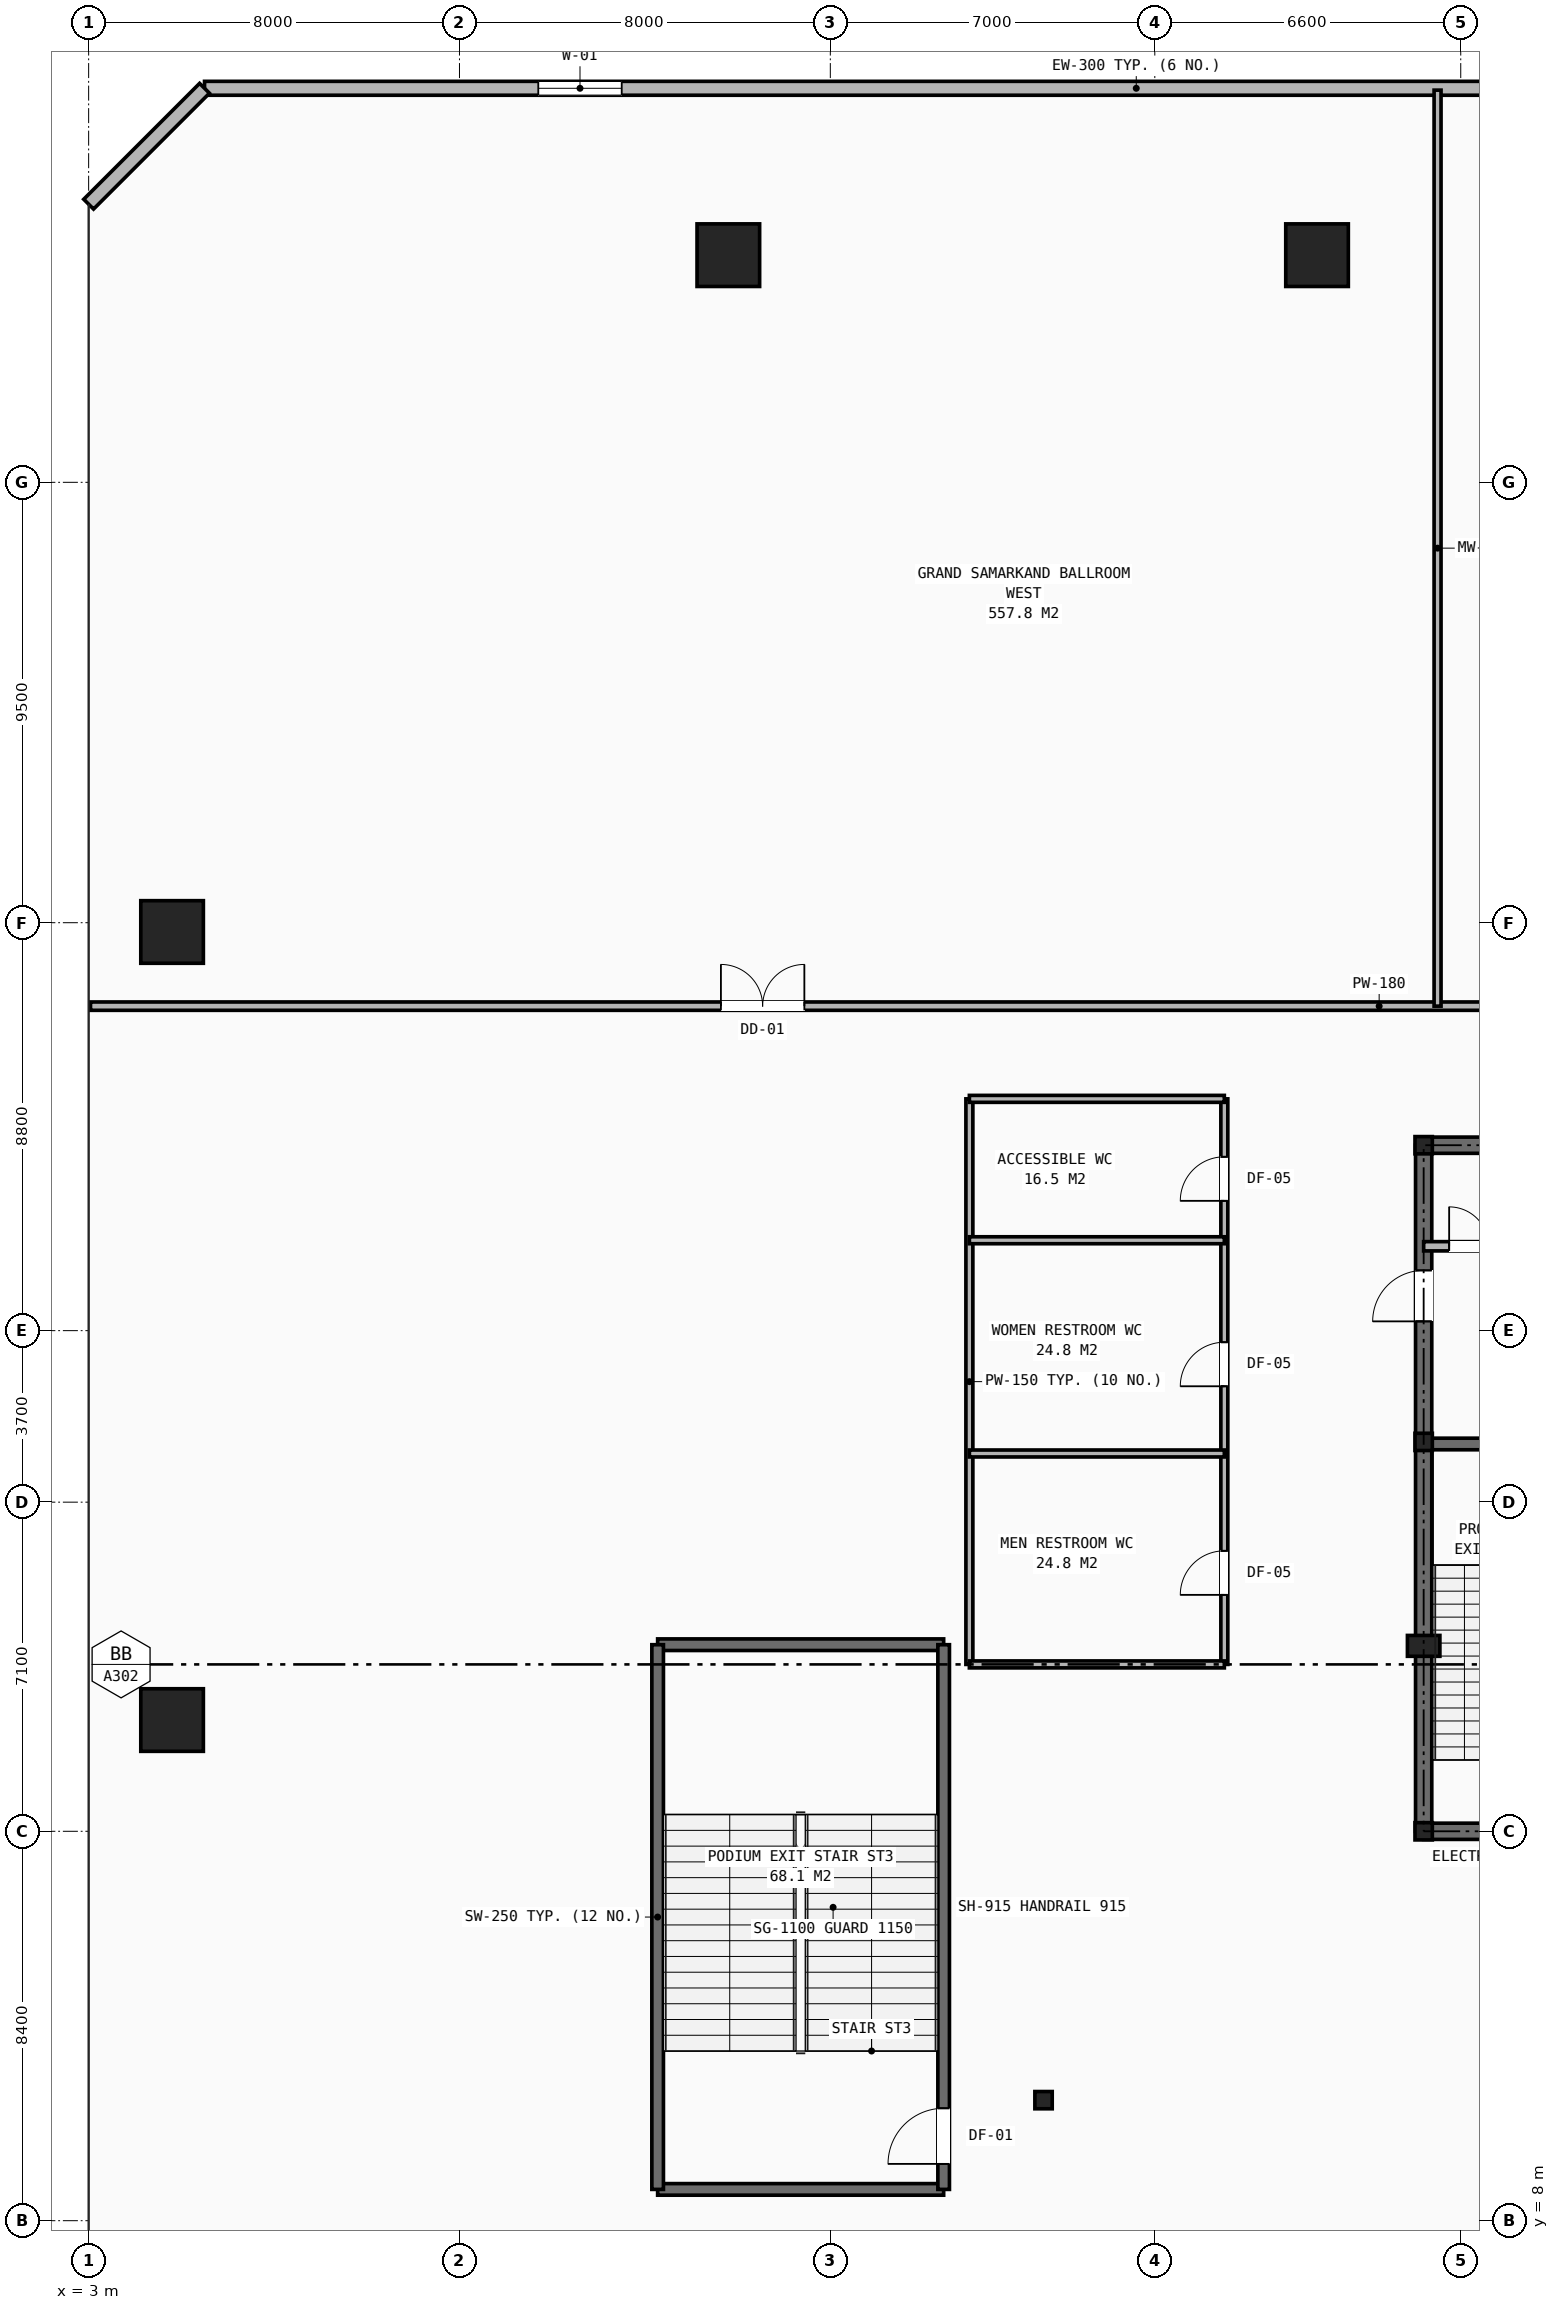
"""IFC4 building model, lengths in metres.
Left out: names, types, materials, properties, quantities, classifications, styles, units other than length and angle.
Written with IfcOpenShell. Run it as: python <this file> out.ifc"""

import sys

from ifc_helpers import new_model, si_unit, direction, frame, frame_2d, origin, origin_2d, place, context, subcontext, project, spatial, rectangle, hollow_rectangle, i_section, extrude, element, fill, save


model = new_model("IFC4")
c1 = context("Model", 3, precision=1e-05, world=origin(), true_north=direction((0.0, 1.0)))
c2 = subcontext(c1, "Body", "Model", "MODEL_VIEW")
j1 = project(units=[si_unit("LENGTHUNIT", "METRE"), si_unit("PLANEANGLEUNIT", "RADIAN")], contexts=[c1])
p1 = place(None, origin())
s1 = spatial("IfcSite", under=j1, at=p1, CompositionType="ELEMENT")
p2 = place(p1, origin())
s2 = spatial("IfcBuilding", under=s1, at=p2, CompositionType="ELEMENT")
p3 = place(p2, frame((0.0, 0.0, 16.5)))
s3 = spatial("IfcBuildingStorey", under=s2, at=p3, CompositionType="ELEMENT", Elevation=16.5)
for number, where, z_axis, x_axis in (
    (1, (31.8, 16.4, 0.0), (0.0, 0.0, 1.0), (1.0, 0.0, 0.0)),
    (2, (31.8, 24.8, 0.0), (0.0, 0.0, 1.0), (1.0, 0.0, 0.0)),
    (3, (31.8, 31.2, 0.0), (0.0, 0.0, 1.0), (1.0, 0.0, 0.0)),
    (4, (23.6, 10.6, 0.0), (0.0, 0.0, 1.0), (1.0, 0.0, 0.0)),
):
    element("IfcColumn", number, at=place(p3, frame(where, z_axis=z_axis, x_axis=x_axis)), inside=s3, PredefinedType="COLUMN", context=c2, shape_type="SweptSolid", body=[
        extrude(i_section(OverallWidth=0.374, OverallDepth=0.372, WebThickness=0.016, FlangeThickness=0.026, at=origin_2d()), origin(), (0.0, 0.0, 1.0), 5.5),
    ])
p4 = place(p3, frame((31.8, 20.4, 0.0), z_axis=(0.0, 0.0, 1.0), x_axis=(1.0, 0.0, 0.0)))
e5 = element("IfcColumn", 5, at=p4, inside=s3, PredefinedType="PILASTER", context=c2, shape_type="SweptSolid", body=[
    extrude(rectangle(XDim=0.7, YDim=0.45, at=origin_2d()), origin(), (0.0, 0.0, 1.0), 5.5),
])
for number, where, z_axis, x_axis in (
    (6, (4.8, 18.8, 0.0), (0.0, 0.0, 1.0), (1.0, 0.0, 0.0)),
    (7, (4.8, 35.8, 0.0), (0.0, 0.0, 1.0), (1.0, 0.0, 0.0)),
    (8, (16.8, 50.4, 0.0), (0.0, 0.0, 1.0), (1.0, 0.0, 0.0)),
    (9, (29.5, 50.4, 0.0), (0.0, 0.0, 1.0), (1.0, 0.0, 0.0)),
):
    element("IfcColumn", number, at=place(p3, frame(where, z_axis=z_axis, x_axis=x_axis)), inside=s3, PredefinedType="COLUMN", context=c2, shape_type="SweptSolid", body=[
        extrude(hollow_rectangle(XDim=1.35, YDim=1.35, WallThickness=0.085, at=origin_2d()), origin(), (0.0, 0.0, 1.0), 5.5),
    ])
p5 = place(p3, frame((74.5, 54.0, 0.0), z_axis=(0.0, 0.0, 1.0), x_axis=(-1.0, 0.0, 0.0)))
e10 = element("IfcWall", 10, at=p5, inside=s3, PredefinedType="STANDARD", context=c2, shape_type="SweptSolid", body=[
    extrude(rectangle(XDim=69.0, YDim=0.3, at=frame_2d((34.5, 0.0))), origin(), (0.0, 0.0, 1.0), 5.18),
])
p6 = place(p5, frame((8.0, 0.0, 1.1)))
e11 = element("IfcOpeningElement", 11, at=p6, cuts=e10, PredefinedType="OPENING", context=c2, shape_type="SweptSolid", body=[
    extrude(rectangle(XDim=1.8, YDim=2.1, at=frame_2d((0.9, 1.05))), frame((0.0, 0.16, 0.0), z_axis=(0.0, -1.0, 0.0), x_axis=(1.0, 0.0, 0.0)), (0.0, 0.0, 1.0), 0.32),
])
p7 = place(p5, frame((16.0, 0.0, 1.1)))
e12 = element("IfcOpeningElement", 12, at=p7, cuts=e10, PredefinedType="OPENING", context=c2, shape_type="SweptSolid", body=[
    extrude(rectangle(XDim=1.8, YDim=2.1, at=frame_2d((0.9, 1.05))), frame((0.0, 0.16, 0.0), z_axis=(0.0, -1.0, 0.0), x_axis=(1.0, 0.0, 0.0)), (0.0, 0.0, 1.0), 0.32),
])
p8 = place(p5, frame((36.0, 0.0, 1.1)))
e13 = element("IfcOpeningElement", 13, at=p8, cuts=e10, PredefinedType="OPENING", context=c2, shape_type="SweptSolid", body=[
    extrude(rectangle(XDim=1.8, YDim=2.1, at=frame_2d((0.9, 1.05))), frame((0.0, 0.16, 0.0), z_axis=(0.0, -1.0, 0.0), x_axis=(1.0, 0.0, 0.0)), (0.0, 0.0, 1.0), 0.32),
])
p9 = place(p5, frame((60.0, 0.0, 1.1)))
e14 = element("IfcOpeningElement", 14, at=p9, cuts=e10, PredefinedType="OPENING", context=c2, shape_type="SweptSolid", body=[
    extrude(rectangle(XDim=1.8, YDim=2.1, at=frame_2d((0.9, 1.05))), frame((0.0, 0.16, 0.0), z_axis=(0.0, -1.0, 0.0), x_axis=(1.0, 0.0, 0.0)), (0.0, 0.0, 1.0), 0.32),
])
p10 = place(p3, frame((5.5, 54.0, 0.0), z_axis=(0.0, 0.0, 1.0), x_axis=(-0.707106781187, -0.707106781187, 0.0)))
e15 = element("IfcWall", 15, at=p10, inside=s3, PredefinedType="STANDARD", context=c2, shape_type="SweptSolid", body=[
    extrude(rectangle(XDim=3.536, YDim=0.3, at=frame_2d((1.768, 0.0))), origin(), (0.0, 0.0, 1.0), 5.18),
])
p11 = place(p3, frame((31.8, 16.4, 0.0), z_axis=(0.0, 0.0, 1.0), x_axis=(1.0, 0.0, 0.0)))
e16 = element("IfcWall", 16, at=p11, inside=s3, PredefinedType="SHEAR", context=c2, shape_type="SweptSolid", body=[
    extrude(rectangle(XDim=16.4, YDim=0.35, at=frame_2d((8.2, 0.0))), origin(), (0.0, 0.0, 1.0), 5.18),
])
p12 = place(p11, frame((7.75, 0.0, 0.0)))
e17 = element("IfcOpeningElement", 17, at=p12, cuts=e16, PredefinedType="OPENING", context=c2, shape_type="SweptSolid", body=[
    extrude(rectangle(XDim=0.9, YDim=2.1, at=frame_2d((0.45, 1.05))), frame((0.0, 0.185, 0.0), z_axis=(0.0, -1.0, 0.0), x_axis=(1.0, 0.0, 0.0)), (0.0, 0.0, 1.0), 0.37),
])
p13 = place(p11, frame((4.2, 0.0, 0.0)))
e18 = element("IfcOpeningElement", 18, at=p13, cuts=e16, PredefinedType="OPENING", context=c2, shape_type="SweptSolid", body=[
    extrude(rectangle(XDim=0.95, YDim=2.1, at=frame_2d((0.475, 1.05))), frame((0.0, 0.185, 0.0), z_axis=(0.0, -1.0, 0.0), x_axis=(1.0, 0.0, 0.0)), (0.0, 0.0, 1.0), 0.37),
])
p14 = place(p11, frame((10.6, 0.0, 0.0)))
e19 = element("IfcOpeningElement", 19, at=p14, cuts=e16, PredefinedType="OPENING", context=c2, shape_type="SweptSolid", body=[
    extrude(rectangle(XDim=0.95, YDim=2.1, at=frame_2d((0.475, 1.05))), frame((0.0, 0.185, 0.0), z_axis=(0.0, -1.0, 0.0), x_axis=(1.0, 0.0, 0.0)), (0.0, 0.0, 1.0), 0.37),
])
p15 = place(p3, frame((31.8, 31.2, 0.0), z_axis=(0.0, 0.0, 1.0), x_axis=(1.0, 0.0, 0.0)))
e20 = element("IfcWall", 20, at=p15, inside=s3, PredefinedType="SHEAR", context=c2, shape_type="SweptSolid", body=[
    extrude(rectangle(XDim=16.4, YDim=0.35, at=frame_2d((8.2, 0.0))), origin(), (0.0, 0.0, 1.0), 5.18),
])
p16 = place(p3, frame((31.8, 16.4, 0.0), z_axis=(0.0, 0.0, 1.0), x_axis=(0.0, 1.0, 0.0)))
e21 = element("IfcWall", 21, at=p16, inside=s3, PredefinedType="SHEAR", context=c2, shape_type="SweptSolid", body=[
    extrude(rectangle(XDim=14.8, YDim=0.35, at=frame_2d((7.4, 0.0))), origin(), (0.0, 0.0, 1.0), 5.18),
])
p17 = place(p16, frame((11.0, 0.0, 0.0)))
e22 = element("IfcOpeningElement", 22, at=p17, cuts=e21, PredefinedType="OPENING", context=c2, shape_type="SweptSolid", body=[
    extrude(rectangle(XDim=1.1, YDim=2.15, at=frame_2d((0.55, 1.075))), frame((0.0, 0.185, 0.0), z_axis=(0.0, -1.0, 0.0), x_axis=(1.0, 0.0, 0.0)), (0.0, 0.0, 1.0), 0.37),
])
p18 = place(p3, frame((31.8, 24.755, 0.0), z_axis=(0.0, 0.0, 1.0), x_axis=(1.0, 0.0, 0.0)))
e23 = element("IfcWall", 23, at=p18, inside=s3, PredefinedType="SHEAR", context=c2, shape_type="SweptSolid", body=[
    extrude(rectangle(XDim=3.245, YDim=0.25, at=frame_2d((1.623, 0.0))), origin(), (0.0, 0.0, 1.0), 5.18),
])
p19 = place(p3, frame((31.8, 29.02, 0.0), z_axis=(0.0, 0.0, 1.0), x_axis=(1.0, 0.0, 0.0)))
e24 = element("IfcWall", 24, at=p19, inside=s3, PredefinedType="SOLIDWALL", context=c2, shape_type="SweptSolid", body=[
    extrude(rectangle(XDim=16.4, YDim=0.2, at=frame_2d((8.2, 0.0))), origin(), (0.0, 0.0, 1.0), 4.631),
])
p20 = place(p19, frame((0.55, 0.0, 0.0)))
e25 = element("IfcOpeningElement", 25, at=p20, cuts=e24, PredefinedType="OPENING", context=c2, shape_type="SweptSolid", body=[
    extrude(rectangle(XDim=0.85, YDim=2.05, at=frame_2d((0.425, 1.025))), frame((0.0, 0.11, 0.0), z_axis=(0.0, -1.0, 0.0), x_axis=(1.0, 0.0, 0.0)), (0.0, 0.0, 1.0), 0.22),
])
for number, where, z_axis, x_axis in (
    (26, (15.275, 20.425, 0.0), (0.0, 0.0, 1.0), (1.0, 0.0, 0.0)),
    (27, (15.275, 8.675, 0.0), (0.0, 0.0, 1.0), (1.0, 0.0, 0.0)),
):
    element("IfcWall", number, at=place(p3, frame(where, z_axis=z_axis, x_axis=x_axis)), inside=s3, PredefinedType="SHEAR", context=c2, shape_type="SweptSolid", body=[
        extrude(rectangle(XDim=6.17, YDim=0.25, at=frame_2d((3.085, 0.0))), origin(), (0.0, 0.0, 1.0), 5.18),
    ])
p21 = place(p3, frame((15.275, 8.675, 0.0), z_axis=(0.0, 0.0, 1.0), x_axis=(0.0, 1.0, 0.0)))
e28 = element("IfcWall", 28, at=p21, inside=s3, PredefinedType="SHEAR", context=c2, shape_type="SweptSolid", body=[
    extrude(rectangle(XDim=11.75, YDim=0.25, at=frame_2d((5.875, 0.0))), origin(), (0.0, 0.0, 1.0), 5.18),
])
p22 = place(p3, frame((21.445, 8.675, 0.0), z_axis=(0.0, 0.0, 1.0), x_axis=(0.0, 1.0, 0.0)))
e29 = element("IfcWall", 29, at=p22, inside=s3, PredefinedType="SHEAR", context=c2, shape_type="SweptSolid", body=[
    extrude(rectangle(XDim=11.75, YDim=0.25, at=frame_2d((5.875, 0.0))), origin(), (0.0, 0.0, 1.0), 5.18),
])
p23 = place(p22, frame((0.55, 0.0, 0.0)))
e30 = element("IfcOpeningElement", 30, at=p23, cuts=e29, PredefinedType="OPENING", context=c2, shape_type="SweptSolid", body=[
    extrude(rectangle(XDim=1.2, YDim=2.15, at=frame_2d((0.6, 1.075))), frame((0.0, 0.135, 0.0), z_axis=(0.0, -1.0, 0.0), x_axis=(1.0, 0.0, 0.0)), (0.0, 0.0, 1.0), 0.27),
])
p24 = place(p3, frame((3.04, 34.2, 0.0), z_axis=(0.0, 0.0, 1.0), x_axis=(1.0, 0.0, 0.0)))
e31 = element("IfcWall", 31, at=p24, inside=s3, PredefinedType="PARTITIONING", context=c2, shape_type="SweptSolid", body=[
    extrude(rectangle(XDim=73.92, YDim=0.18, at=frame_2d((36.96, 0.0))), origin(), (0.0, 0.0, 1.0), 4.243),
])
p25 = place(p24, frame((13.6, 0.0, 0.0)))
e32 = element("IfcOpeningElement", 32, at=p25, cuts=e31, PredefinedType="OPENING", context=c2, shape_type="SweptSolid", body=[
    extrude(rectangle(XDim=1.8, YDim=2.4, at=frame_2d((0.9, 1.2))), frame((0.0, 0.1, 0.0), z_axis=(0.0, -1.0, 0.0), x_axis=(1.0, 0.0, 0.0)), (0.0, 0.0, 1.0), 0.2),
])
p26 = place(p24, frame((40.2, 0.0, 0.0)))
e33 = element("IfcOpeningElement", 33, at=p26, cuts=e31, PredefinedType="OPENING", context=c2, shape_type="SweptSolid", body=[
    extrude(rectangle(XDim=1.8, YDim=2.4, at=frame_2d((0.9, 1.2))), frame((0.0, 0.1, 0.0), z_axis=(0.0, -1.0, 0.0), x_axis=(1.0, 0.0, 0.0)), (0.0, 0.0, 1.0), 0.2),
])
p27 = place(p24, frame((62.7, 0.0, 0.0)))
e34 = element("IfcOpeningElement", 34, at=p27, cuts=e31, PredefinedType="OPENING", context=c2, shape_type="SweptSolid", body=[
    extrude(rectangle(XDim=1.8, YDim=2.4, at=frame_2d((0.9, 1.2))), frame((0.0, 0.1, 0.0), z_axis=(0.0, -1.0, 0.0), x_axis=(1.0, 0.0, 0.0)), (0.0, 0.0, 1.0), 0.2),
])
p28 = place(p3, frame((32.1, 34.2, 0.0), z_axis=(0.0, 0.0, 1.0), x_axis=(0.0, 1.0, 0.0)))
e35 = element("IfcWall", 35, at=p28, inside=s3, PredefinedType="MOVABLE", context=c2, shape_type="SweptSolid", body=[
    extrude(rectangle(XDim=19.76, YDim=0.15, at=frame_2d((9.88, 0.0))), origin(), (0.0, 0.0, 1.0), 4.243),
])
p29 = place(p3, frame((27.5, 20.0, 0.0), z_axis=(0.0, 0.0, 1.0), x_axis=(0.0, 1.0, 0.0)))
e36 = element("IfcWall", 36, at=p29, inside=s3, PredefinedType="PARTITIONING", context=c2, shape_type="SweptSolid", body=[
    extrude(rectangle(XDim=12.2, YDim=0.15, at=frame_2d((6.1, 0.0))), origin(), (0.0, 0.0, 1.0), 4.243),
])
p30 = place(p29, frame((1.5, 0.0, 0.0)))
e37 = element("IfcOpeningElement", 37, at=p30, cuts=e36, PredefinedType="OPENING", context=c2, shape_type="SweptSolid", body=[
    extrude(rectangle(XDim=0.95, YDim=2.1, at=frame_2d((0.475, 1.05))), frame((0.0, 0.085, 0.0), z_axis=(0.0, -1.0, 0.0), x_axis=(1.0, 0.0, 0.0)), (0.0, 0.0, 1.0), 0.17),
])
p31 = place(p29, frame((6.0, 0.0, 0.0)))
e38 = element("IfcOpeningElement", 38, at=p31, cuts=e36, PredefinedType="OPENING", context=c2, shape_type="SweptSolid", body=[
    extrude(rectangle(XDim=0.95, YDim=2.1, at=frame_2d((0.475, 1.05))), frame((0.0, 0.085, 0.0), z_axis=(0.0, -1.0, 0.0), x_axis=(1.0, 0.0, 0.0)), (0.0, 0.0, 1.0), 0.17),
])
p32 = place(p29, frame((10.0, 0.0, 0.0)))
e39 = element("IfcOpeningElement", 39, at=p32, cuts=e36, PredefinedType="OPENING", context=c2, shape_type="SweptSolid", body=[
    extrude(rectangle(XDim=0.95, YDim=2.1, at=frame_2d((0.475, 1.05))), frame((0.0, 0.085, 0.0), z_axis=(0.0, -1.0, 0.0), x_axis=(1.0, 0.0, 0.0)), (0.0, 0.0, 1.0), 0.17),
])
p33 = place(p3, frame((22.0, 20.0, 0.0), z_axis=(0.0, 0.0, 1.0), x_axis=(0.0, 1.0, 0.0)))
e40 = element("IfcWall", 40, at=p33, inside=s3, PredefinedType="PARTITIONING", context=c2, shape_type="SweptSolid", body=[
    extrude(rectangle(XDim=12.2, YDim=0.15, at=frame_2d((6.1, 0.0))), origin(), (0.0, 0.0, 1.0), 5.18),
])
for number, where, z_axis, x_axis in (
    (41, (22.0, 20.0, 0.0), (0.0, 0.0, 1.0), (1.0, 0.0, 0.0)),
    (42, (22.0, 24.55, 0.0), (0.0, 0.0, 1.0), (1.0, 0.0, 0.0)),
    (43, (22.0, 29.15, 0.0), (0.0, 0.0, 1.0), (1.0, 0.0, 0.0)),
):
    element("IfcWall", number, at=place(p3, frame(where, z_axis=z_axis, x_axis=x_axis)), inside=s3, PredefinedType="PARTITIONING", context=c2, shape_type="SweptSolid", body=[
        extrude(rectangle(XDim=5.5, YDim=0.15, at=frame_2d((2.75, 0.0))), origin(), (0.0, 0.0, 1.0), 5.18),
    ])
p34 = place(p3, frame((22.0, 32.2, 0.0), z_axis=(0.0, 0.0, 1.0), x_axis=(1.0, 0.0, 0.0)))
e44 = element("IfcWall", 44, at=p34, inside=s3, PredefinedType="PARTITIONING", context=c2, shape_type="SweptSolid", body=[
    extrude(rectangle(XDim=5.5, YDim=0.15, at=frame_2d((2.75, 0.0))), origin(), (0.0, 0.0, 1.0), 4.243),
])
p35 = place(p9, origin())
e45 = element("IfcWindow", 45, at=p35, inside=s3, PartitioningType="SINGLE_PANEL", PredefinedType="WINDOW", context=c2, shape_type="SweptSolid", body=[
    extrude(rectangle(XDim=1.8, YDim=2.1, at=frame_2d((0.9, 1.05))), frame((0.0, 0.03, 0.0), z_axis=(0.0, -1.0, 0.0), x_axis=(1.0, 0.0, 0.0)), (0.0, 0.0, 1.0), 0.06),
])
fill(e14, e45)
p36 = place(p20, origin())
e46 = element("IfcDoor", 46, at=p36, inside=s3, OperationType="SINGLE_SWING_LEFT", PredefinedType="DOOR", context=c2, shape_type="SweptSolid", body=[
    extrude(rectangle(XDim=0.85, YDim=2.05, at=frame_2d((0.425, 1.025))), frame((0.0, 0.025, 0.0), z_axis=(0.0, -1.0, 0.0), x_axis=(1.0, 0.0, 0.0)), (0.0, 0.0, 1.0), 0.05),
])
fill(e25, e46)
p37 = place(p17, origin())
e47 = element("IfcDoor", 47, at=p37, inside=s3, OperationType="SINGLE_SWING_LEFT", PredefinedType="DOOR", context=c2, shape_type="SweptSolid", body=[
    extrude(rectangle(XDim=1.1, YDim=2.15, at=frame_2d((0.55, 1.075))), frame((0.0, 0.025, 0.0), z_axis=(0.0, -1.0, 0.0), x_axis=(1.0, 0.0, 0.0)), (0.0, 0.0, 1.0), 0.05),
])
fill(e22, e47)
p38 = place(p25, origin())
e48 = element("IfcDoor", 48, at=p38, inside=s3, OperationType="DOUBLE_DOOR_SINGLE_SWING", PredefinedType="DOOR", context=c2, shape_type="SweptSolid", body=[
    extrude(rectangle(XDim=1.8, YDim=2.4, at=frame_2d((0.9, 1.2))), frame((0.0, 0.025, 0.0), z_axis=(0.0, -1.0, 0.0), x_axis=(1.0, 0.0, 0.0)), (0.0, 0.0, 1.0), 0.05),
])
fill(e32, e48)
p39 = place(p30, origin())
e49 = element("IfcDoor", 49, at=p39, inside=s3, OperationType="SINGLE_SWING_LEFT", PredefinedType="DOOR", context=c2, shape_type="SweptSolid", body=[
    extrude(rectangle(XDim=0.95, YDim=2.1, at=frame_2d((0.475, 1.05))), frame((0.0, 0.025, 0.0), z_axis=(0.0, -1.0, 0.0), x_axis=(1.0, 0.0, 0.0)), (0.0, 0.0, 1.0), 0.05),
])
fill(e37, e49)
p40 = place(p31, origin())
e50 = element("IfcDoor", 50, at=p40, inside=s3, OperationType="SINGLE_SWING_LEFT", PredefinedType="DOOR", context=c2, shape_type="SweptSolid", body=[
    extrude(rectangle(XDim=0.95, YDim=2.1, at=frame_2d((0.475, 1.05))), frame((0.0, 0.025, 0.0), z_axis=(0.0, -1.0, 0.0), x_axis=(1.0, 0.0, 0.0)), (0.0, 0.0, 1.0), 0.05),
])
fill(e38, e50)
p41 = place(p32, origin())
e51 = element("IfcDoor", 51, at=p41, inside=s3, OperationType="SINGLE_SWING_LEFT", PredefinedType="DOOR", context=c2, shape_type="SweptSolid", body=[
    extrude(rectangle(XDim=0.95, YDim=2.1, at=frame_2d((0.475, 1.05))), frame((0.0, 0.025, 0.0), z_axis=(0.0, -1.0, 0.0), x_axis=(1.0, 0.0, 0.0)), (0.0, 0.0, 1.0), 0.05),
])
fill(e39, e51)
p42 = place(p23, origin())
e52 = element("IfcDoor", 52, at=p42, inside=s3, OperationType="SINGLE_SWING_LEFT", PredefinedType="DOOR", context=c2, shape_type="SweptSolid", body=[
    extrude(rectangle(XDim=1.2, YDim=2.15, at=frame_2d((0.6, 1.075))), frame((0.0, 0.025, 0.0), z_axis=(0.0, -1.0, 0.0), x_axis=(1.0, 0.0, 0.0)), (0.0, 0.0, 1.0), 0.05),
])
fill(e30, e52)
save(model, sys.argv[1])
